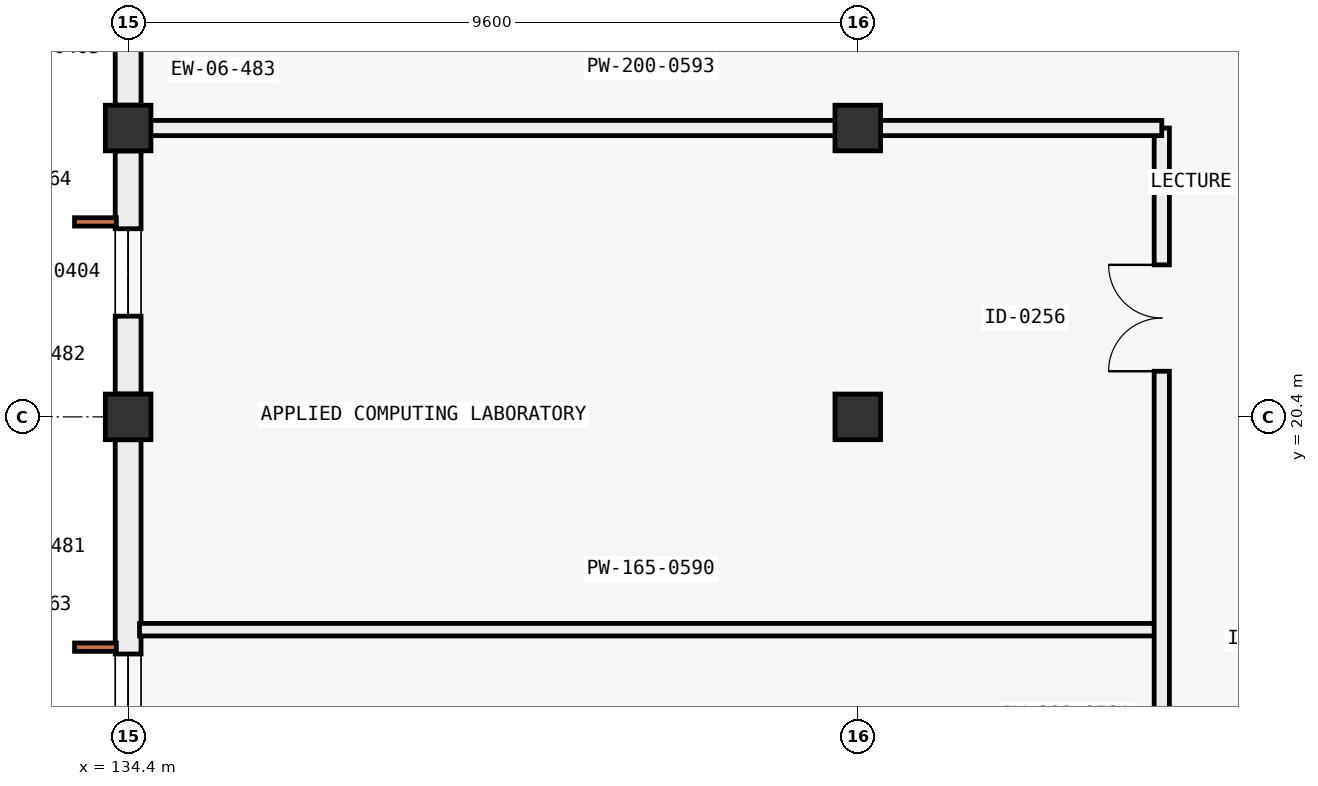
"""IFC4 building model, lengths in metres.
Left out: names, types, materials, properties, quantities, classifications, styles, units other than length and angle.
Written with IfcOpenShell. Run it as: python <this file> out.ifc"""

import sys

from ifc_helpers import new_model, si_unit, direction, frame, frame_2d, origin, origin_2d, place, context, subcontext, project, spatial, rectangle, extrude, element, fill, save


model = new_model("IFC4")
c1 = context("Model", 3, precision=1e-05, world=origin(), true_north=direction((0.0, 1.0)))
c2 = subcontext(c1, "Body", "Model", "MODEL_VIEW")
j1 = project(units=[si_unit("LENGTHUNIT", "METRE"), si_unit("PLANEANGLEUNIT", "RADIAN")], contexts=[c1])
p1 = place(None, origin())
s1 = spatial("IfcSite", under=j1, at=p1, CompositionType="ELEMENT")
p2 = place(p1, origin())
s2 = spatial("IfcBuilding", under=s1, at=p2, CompositionType="ELEMENT")
p3 = place(p2, frame((0.0, 0.0, 13.8)))
s3 = spatial("IfcBuildingStorey", under=s2, at=p3, CompositionType="ELEMENT", Elevation=13.8)
for number, where, z_axis, x_axis in (
    (1, (134.4, 20.4, 0.0), (0.0, 0.0, 1.0), (1.0, 0.0, 0.0)),
    (2, (134.4, 24.2, 0.0), (0.0, 0.0, 1.0), (1.0, 0.0, 0.0)),
    (3, (144.0, 20.4, 0.0), (0.0, 0.0, 1.0), (1.0, 0.0, 0.0)),
    (4, (144.0, 24.2, 0.0), (0.0, 0.0, 1.0), (1.0, 0.0, 0.0)),
):
    element("IfcColumn", number, at=place(p3, frame(where, z_axis=z_axis, x_axis=x_axis)), inside=s3, PredefinedType="COLUMN", context=c2, shape_type="SweptSolid", body=[
        extrude(rectangle(XDim=0.6, YDim=0.6, at=origin_2d()), origin(), (0.0, 0.0, 1.0), 4.2),
    ])
p4 = place(p3, frame((134.4, 10.501, 0.0), z_axis=(0.0, 0.0, 1.0), x_axis=(0.0, 1.0, 0.0)))
e5 = element("IfcWall", 5, at=p4, inside=s3, PredefinedType="SOLIDWALL", context=c2, shape_type="SweptSolid", body=[
    extrude(rectangle(XDim=9.598, YDim=0.34, at=frame_2d((4.799, 0.0))), origin(), (0.0, 0.0, 1.0), 3.28),
])
p5 = place(p4, frame((1.35, 0.0, 0.85)))
e6 = element("IfcOpeningElement", 6, at=p5, cuts=e5, PredefinedType="OPENING", context=c2, shape_type="SweptSolid", body=[
    extrude(rectangle(XDim=2.0, YDim=1.35, at=frame_2d((1.0, 0.675))), frame((0.0, 0.18, 0.0), z_axis=(0.0, -1.0, 0.0), x_axis=(1.0, 0.0, 0.0)), (0.0, 0.0, 1.0), 0.36),
])
p6 = place(p4, frame((4.779, 0.0, 0.85)))
e7 = element("IfcOpeningElement", 7, at=p6, cuts=e5, PredefinedType="OPENING", context=c2, shape_type="SweptSolid", body=[
    extrude(rectangle(XDim=2.0, YDim=1.35, at=frame_2d((1.0, 0.675))), frame((0.0, 0.18, 0.0), z_axis=(0.0, -1.0, 0.0), x_axis=(1.0, 0.0, 0.0)), (0.0, 0.0, 1.0), 0.36),
])
p7 = place(p3, frame((134.4, 20.701, 0.0), z_axis=(0.0, 0.0, 1.0), x_axis=(0.0, 1.0, 0.0)))
e8 = element("IfcWall", 8, at=p7, inside=s3, PredefinedType="SOLIDWALL", context=c2, shape_type="SweptSolid", body=[
    extrude(rectangle(XDim=3.198, YDim=0.34, at=frame_2d((1.599, 0.0))), origin(), (0.0, 0.0, 1.0), 3.28),
])
p8 = place(p7, frame((1.024, 0.0, 0.9)))
e9 = element("IfcOpeningElement", 9, at=p8, cuts=e8, PredefinedType="OPENING", context=c2, shape_type="SweptSolid", body=[
    extrude(rectangle(XDim=1.15, YDim=1.7, at=frame_2d((0.575, 0.85))), frame((0.0, 0.18, 0.0), z_axis=(0.0, -1.0, 0.0), x_axis=(1.0, 0.0, 0.0)), (0.0, 0.0, 1.0), 0.36),
])
p9 = place(p3, frame((134.4, 24.501, 0.0), z_axis=(0.0, 0.0, 1.0), x_axis=(0.0, 1.0, 0.0)))
e10 = element("IfcWall", 10, at=p9, inside=s3, PredefinedType="SOLIDWALL", context=c2, shape_type="SweptSolid", body=[
    extrude(rectangle(XDim=2.598, YDim=0.34, at=frame_2d((1.299, 0.0))), origin(), (0.0, 0.0, 1.0), 3.28),
])
p10 = place(p9, frame((0.924, 0.0, 0.75)))
e11 = element("IfcOpeningElement", 11, at=p10, cuts=e10, PredefinedType="OPENING", context=c2, shape_type="SweptSolid", body=[
    extrude(rectangle(XDim=0.75, YDim=1.1, at=frame_2d((0.375, 0.55))), frame((0.0, 0.18, 0.0), z_axis=(0.0, -1.0, 0.0), x_axis=(1.0, 0.0, 0.0)), (0.0, 0.0, 1.0), 0.36),
])
p11 = place(p3, frame((134.55, 17.6, 0.0), z_axis=(0.0, 0.0, 1.0), x_axis=(1.0, 0.0, 0.0)))
e12 = element("IfcWall", 12, at=p11, inside=s3, PredefinedType="PARTITIONING", context=c2, shape_type="SweptSolid", body=[
    extrude(rectangle(XDim=13.45, YDim=0.165, at=frame_2d((6.725, 0.0))), origin(), (0.0, 0.0, 1.0), 3.28),
])
p12 = place(p3, frame((148.0, 10.2, 0.0), z_axis=(0.0, 0.0, 1.0), x_axis=(0.0, 1.0, 0.0)))
e13 = element("IfcWall", 13, at=p12, inside=s3, PredefinedType="PARTITIONING", context=c2, shape_type="SweptSolid", body=[
    extrude(rectangle(XDim=14.0, YDim=0.2, at=frame_2d((7.0, 0.0))), origin(), (0.0, 0.0, 1.0), 3.23),
])
p13 = place(p12, frame((3.2, 0.0, 0.0)))
e14 = element("IfcOpeningElement", 14, at=p13, cuts=e13, PredefinedType="OPENING", context=c2, shape_type="SweptSolid", body=[
    extrude(rectangle(XDim=0.95, YDim=2.1, at=frame_2d((0.475, 1.05))), frame((0.0, 0.11, 0.0), z_axis=(0.0, -1.0, 0.0), x_axis=(1.0, 0.0, 0.0)), (0.0, 0.0, 1.0), 0.22),
])
p14 = place(p12, frame((10.8, 0.0, 0.0)))
e15 = element("IfcOpeningElement", 15, at=p14, cuts=e13, PredefinedType="OPENING", context=c2, shape_type="SweptSolid", body=[
    extrude(rectangle(XDim=1.4, YDim=2.2, at=frame_2d((0.7, 1.1))), frame((0.0, 0.11, 0.0), z_axis=(0.0, -1.0, 0.0), x_axis=(1.0, 0.0, 0.0)), (0.0, 0.0, 1.0), 0.22),
])
p15 = place(p3, frame((134.55, 24.2, 0.0), z_axis=(0.0, 0.0, 1.0), x_axis=(1.0, 0.0, 0.0)))
e16 = element("IfcWall", 16, at=p15, inside=s3, PredefinedType="PARTITIONING", context=c2, shape_type="SweptSolid", body=[
    extrude(rectangle(XDim=13.45, YDim=0.2, at=frame_2d((6.725, 0.0))), origin(), (0.0, 0.0, 1.0), 3.28),
])
p16 = place(p6, origin())
e17 = element("IfcWindow", 17, at=p16, inside=s3, PartitioningType="SINGLE_PANEL", PredefinedType="WINDOW", context=c2, shape_type="SweptSolid", body=[
    extrude(rectangle(XDim=2.0, YDim=1.35, at=frame_2d((1.0, 0.675))), frame((0.0, 0.03, 0.0), z_axis=(0.0, -1.0, 0.0), x_axis=(1.0, 0.0, 0.0)), (0.0, 0.0, 1.0), 0.06),
])
fill(e7, e17)
p17 = place(p8, origin())
e18 = element("IfcWindow", 18, at=p17, inside=s3, PartitioningType="SINGLE_PANEL", PredefinedType="WINDOW", context=c2, shape_type="SweptSolid", body=[
    extrude(rectangle(XDim=1.15, YDim=1.7, at=frame_2d((0.575, 0.85))), frame((0.0, 0.03, 0.0), z_axis=(0.0, -1.0, 0.0), x_axis=(1.0, 0.0, 0.0)), (0.0, 0.0, 1.0), 0.06),
])
fill(e9, e18)
p18 = place(p14, origin())
e19 = element("IfcDoor", 19, at=p18, inside=s3, OperationType="DOUBLE_DOOR_SINGLE_SWING", PredefinedType="DOOR", context=c2, shape_type="SweptSolid", body=[
    extrude(rectangle(XDim=1.4, YDim=2.2, at=frame_2d((0.7, 1.1))), frame((0.0, 0.025, 0.0), z_axis=(0.0, -1.0, 0.0), x_axis=(1.0, 0.0, 0.0)), (0.0, 0.0, 1.0), 0.05),
])
fill(e15, e19)
save(model, sys.argv[1])
